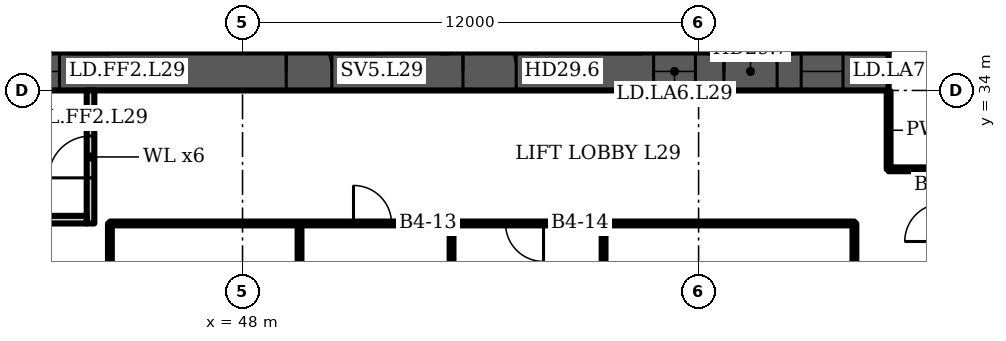
"""IFC4 building model, lengths in metres.
Left out: names, types, materials, properties, quantities, classifications, styles, units other than length and angle.
Written with IfcOpenShell. Run it as: python <this file> out.ifc"""

import sys

from ifc_helpers import new_model, si_unit, direction, frame, frame_2d, origin, place, context, subcontext, project, spatial, rectangle, extrude, element, fill, save


model = new_model("IFC4")
c1 = context("Model", 3, precision=1e-05, world=origin(), true_north=direction((0.0, 1.0)))
c2 = subcontext(c1, "Body", "Model", "MODEL_VIEW")
j1 = project(units=[si_unit("LENGTHUNIT", "METRE"), si_unit("PLANEANGLEUNIT", "RADIAN")], contexts=[c1])
p1 = place(None, origin())
s1 = spatial("IfcSite", under=j1, at=p1, CompositionType="ELEMENT")
p2 = place(p1, origin())
s2 = spatial("IfcBuilding", under=s1, at=p2, CompositionType="ELEMENT")
p3 = place(p2, frame((0.0, 0.0, 125.5)))
s3 = spatial("IfcBuildingStorey", under=s2, at=p3, CompositionType="ELEMENT", Elevation=125.5)
p4 = place(p3, frame((16.0, 34.5, 0.0), z_axis=(0.0, 0.0, 1.0), x_axis=(1.0, 0.0, 0.0)))
e1 = element("IfcWall", 1, at=p4, inside=s3, PredefinedType="SHEAR", context=c2, shape_type="SweptSolid", body=[
    extrude(rectangle(XDim=49.0, YDim=1.0, at=frame_2d((24.5, 0.0))), origin(), (0.0, 0.0, 1.0), 3.6),
])
p5 = place(p4, frame((1.2, 0.0, 0.0)))
e2 = element("IfcOpeningElement", 2, at=p5, cuts=e1, PredefinedType="OPENING", context=c2, shape_type="SweptSolid", body=[
    extrude(rectangle(XDim=1.1, YDim=2.1, at=frame_2d((0.55, 1.05))), frame((0.0, 0.51, 0.0), z_axis=(0.0, -1.0, 0.0), x_axis=(1.0, 0.0, 0.0)), (0.0, 0.0, 1.0), 1.02),
])
p6 = place(p4, frame((5.083, 0.0, 0.0)))
e3 = element("IfcOpeningElement", 3, at=p6, cuts=e1, PredefinedType="OPENING", context=c2, shape_type="SweptSolid", body=[
    extrude(rectangle(XDim=1.1, YDim=2.1, at=frame_2d((0.55, 1.05))), frame((0.0, 0.51, 0.0), z_axis=(0.0, -1.0, 0.0), x_axis=(1.0, 0.0, 0.0)), (0.0, 0.0, 1.0), 1.02),
])
p7 = place(p4, frame((2.933, 0.0, 0.0)))
e4 = element("IfcOpeningElement", 4, at=p7, cuts=e1, PredefinedType="OPENING", context=c2, shape_type="SweptSolid", body=[
    extrude(rectangle(XDim=1.4, YDim=2.1, at=frame_2d((0.7, 1.05))), frame((0.0, 0.51, 0.0), z_axis=(0.0, -1.0, 0.0), x_axis=(1.0, 0.0, 0.0)), (0.0, 0.0, 1.0), 1.02),
])
p8 = place(p4, frame((7.65, 0.0, 0.0)))
e5 = element("IfcOpeningElement", 5, at=p8, cuts=e1, PredefinedType="OPENING", context=c2, shape_type="SweptSolid", body=[
    extrude(rectangle(XDim=1.2, YDim=2.1, at=frame_2d((0.6, 1.05))), frame((0.0, 0.51, 0.0), z_axis=(0.0, -1.0, 0.0), x_axis=(1.0, 0.0, 0.0)), (0.0, 0.0, 1.0), 1.02),
])
p9 = place(p4, frame((14.817, 0.0, 0.0)))
e6 = element("IfcOpeningElement", 6, at=p9, cuts=e1, PredefinedType="OPENING", context=c2, shape_type="SweptSolid", body=[
    extrude(rectangle(XDim=1.1, YDim=2.1, at=frame_2d((0.55, 1.05))), frame((0.0, 0.51, 0.0), z_axis=(0.0, -1.0, 0.0), x_axis=(1.0, 0.0, 0.0)), (0.0, 0.0, 1.0), 1.02),
])
p10 = place(p4, frame((19.083, 0.0, 0.0)))
e7 = element("IfcOpeningElement", 7, at=p10, cuts=e1, PredefinedType="OPENING", context=c2, shape_type="SweptSolid", body=[
    extrude(rectangle(XDim=1.1, YDim=2.1, at=frame_2d((0.55, 1.05))), frame((0.0, 0.51, 0.0), z_axis=(0.0, -1.0, 0.0), x_axis=(1.0, 0.0, 0.0)), (0.0, 0.0, 1.0), 1.02),
])
p11 = place(p4, frame((16.8, 0.0, 0.0)))
e8 = element("IfcOpeningElement", 8, at=p11, cuts=e1, PredefinedType="OPENING", context=c2, shape_type="SweptSolid", body=[
    extrude(rectangle(XDim=1.4, YDim=2.1, at=frame_2d((0.7, 1.05))), frame((0.0, 0.51, 0.0), z_axis=(0.0, -1.0, 0.0), x_axis=(1.0, 0.0, 0.0)), (0.0, 0.0, 1.0), 1.02),
])
p12 = place(p4, frame((21.817, 0.0, 0.0)))
e9 = element("IfcOpeningElement", 9, at=p12, cuts=e1, PredefinedType="OPENING", context=c2, shape_type="SweptSolid", body=[
    extrude(rectangle(XDim=1.1, YDim=2.1, at=frame_2d((0.55, 1.05))), frame((0.0, 0.51, 0.0), z_axis=(0.0, -1.0, 0.0), x_axis=(1.0, 0.0, 0.0)), (0.0, 0.0, 1.0), 1.02),
])
p13 = place(p4, frame((26.083, 0.0, 0.0)))
e10 = element("IfcOpeningElement", 10, at=p13, cuts=e1, PredefinedType="OPENING", context=c2, shape_type="SweptSolid", body=[
    extrude(rectangle(XDim=1.1, YDim=2.1, at=frame_2d((0.55, 1.05))), frame((0.0, 0.51, 0.0), z_axis=(0.0, -1.0, 0.0), x_axis=(1.0, 0.0, 0.0)), (0.0, 0.0, 1.0), 1.02),
])
p14 = place(p4, frame((33.15, 0.0, 0.0)))
e11 = element("IfcOpeningElement", 11, at=p14, cuts=e1, PredefinedType="OPENING", context=c2, shape_type="SweptSolid", body=[
    extrude(rectangle(XDim=1.2, YDim=2.1, at=frame_2d((0.6, 1.05))), frame((0.0, 0.51, 0.0), z_axis=(0.0, -1.0, 0.0), x_axis=(1.0, 0.0, 0.0)), (0.0, 0.0, 1.0), 1.02),
])
p15 = place(p4, frame((37.8, 0.0, 0.0)))
e12 = element("IfcOpeningElement", 12, at=p15, cuts=e1, PredefinedType="OPENING", context=c2, shape_type="SweptSolid", body=[
    extrude(rectangle(XDim=1.4, YDim=2.1, at=frame_2d((0.7, 1.05))), frame((0.0, 0.51, 0.0), z_axis=(0.0, -1.0, 0.0), x_axis=(1.0, 0.0, 0.0)), (0.0, 0.0, 1.0), 1.02),
])
p16 = place(p4, frame((42.817, 0.0, 0.0)))
e13 = element("IfcOpeningElement", 13, at=p16, cuts=e1, PredefinedType="OPENING", context=c2, shape_type="SweptSolid", body=[
    extrude(rectangle(XDim=1.1, YDim=2.1, at=frame_2d((0.55, 1.05))), frame((0.0, 0.51, 0.0), z_axis=(0.0, -1.0, 0.0), x_axis=(1.0, 0.0, 0.0)), (0.0, 0.0, 1.0), 1.02),
])
p17 = place(p4, frame((46.7, 0.0, 0.0)))
e14 = element("IfcOpeningElement", 14, at=p17, cuts=e1, PredefinedType="OPENING", context=c2, shape_type="SweptSolid", body=[
    extrude(rectangle(XDim=1.1, YDim=2.1, at=frame_2d((0.55, 1.05))), frame((0.0, 0.51, 0.0), z_axis=(0.0, -1.0, 0.0), x_axis=(1.0, 0.0, 0.0)), (0.0, 0.0, 1.0), 1.02),
])
p18 = place(p4, frame((44.667, 0.0, 0.0)))
e15 = element("IfcOpeningElement", 15, at=p18, cuts=e1, PredefinedType="OPENING", context=c2, shape_type="SweptSolid", body=[
    extrude(rectangle(XDim=1.4, YDim=2.1, at=frame_2d((0.7, 1.05))), frame((0.0, 0.51, 0.0), z_axis=(0.0, -1.0, 0.0), x_axis=(1.0, 0.0, 0.0)), (0.0, 0.0, 1.0), 1.02),
])
p19 = place(p3, frame((44.0, 30.5, 0.0), z_axis=(0.0, 0.0, 1.0), x_axis=(0.0, 1.0, 0.0)))
e16 = element("IfcWall", 16, at=p19, inside=s3, PredefinedType="PARTITIONING", context=c2, shape_type="SweptSolid", body=[
    extrude(rectangle(XDim=3.5, YDim=0.2, at=frame_2d((1.75, 0.0))), origin(), (0.0, 0.0, 1.0), 3.2),
])
p20 = place(p19, frame((1.2, 0.0, 0.0)))
e17 = element("IfcOpeningElement", 17, at=p20, cuts=e16, PredefinedType="OPENING", context=c2, shape_type="SweptSolid", body=[
    extrude(rectangle(XDim=1.1, YDim=2.1, at=frame_2d((0.55, 1.05))), frame((0.0, 0.11, 0.0), z_axis=(0.0, -1.0, 0.0), x_axis=(1.0, 0.0, 0.0)), (0.0, 0.0, 1.0), 0.22),
])
p21 = place(p3, frame((41.1, 30.6, 0.0), z_axis=(0.0, 0.0, 1.0), x_axis=(1.0, 0.0, 0.0)))
e18 = element("IfcWall", 18, at=p21, inside=s3, PredefinedType="PARTITIONING", context=c2, shape_type="SweptSolid", body=[
    extrude(rectangle(XDim=2.8, YDim=0.2, at=frame_2d((1.4, 0.0))), origin(), (0.0, 0.0, 1.0), 3.2),
])
p22 = place(p3, frame((44.51, 8.437, 0.0), z_axis=(0.0, 0.0, 1.0), x_axis=(0.0, 1.0, 0.0)))
e19 = element("IfcWall", 19, at=p22, inside=s3, PredefinedType="PARTITIONING", context=c2, shape_type="SweptSolid", body=[
    extrude(rectangle(XDim=22.063, YDim=0.1, at=frame_2d((11.031, 0.0))), origin(), (0.0, 0.0, 1.0), 3.2),
])
p23 = place(p22, frame((12.683, 0.0, 0.0)))
e20 = element("IfcOpeningElement", 20, at=p23, cuts=e19, PredefinedType="OPENING", context=c2, shape_type="SweptSolid", body=[
    extrude(rectangle(XDim=1.8, YDim=2.1, at=frame_2d((0.9, 1.05))), frame((0.0, 0.06, 0.0), z_axis=(0.0, -1.0, 0.0), x_axis=(1.0, 0.0, 0.0)), (0.0, 0.0, 1.0), 0.12),
])
p24 = place(p3, frame((44.51, 30.5, 0.0), z_axis=(0.0, 0.0, 1.0), x_axis=(1.0, 0.0, 0.0)))
e21 = element("IfcWall", 21, at=p24, inside=s3, PredefinedType="PARTITIONING", context=c2, shape_type="SweptSolid", body=[
    extrude(rectangle(XDim=19.59, YDim=0.1, at=frame_2d((9.795, 0.0))), origin(), (0.0, 0.0, 1.0), 3.2),
])
p25 = place(p24, frame((6.41, 0.0, 0.0)))
e22 = element("IfcOpeningElement", 22, at=p25, cuts=e21, PredefinedType="OPENING", context=c2, shape_type="SweptSolid", body=[
    extrude(rectangle(XDim=1.0, YDim=2.1, at=frame_2d((0.5, 1.05))), frame((0.0, 0.06, 0.0), z_axis=(0.0, -1.0, 0.0), x_axis=(1.0, 0.0, 0.0)), (0.0, 0.0, 1.0), 0.12),
])
p26 = place(p24, frame((10.41, 0.0, 0.0)))
e23 = element("IfcOpeningElement", 23, at=p26, cuts=e21, PredefinedType="OPENING", context=c2, shape_type="SweptSolid", body=[
    extrude(rectangle(XDim=1.0, YDim=2.1, at=frame_2d((0.5, 1.05))), frame((0.0, 0.06, 0.0), z_axis=(0.0, -1.0, 0.0), x_axis=(1.0, 0.0, 0.0)), (0.0, 0.0, 1.0), 0.12),
])
p27 = place(p3, frame((49.5, -1.498, 0.0), z_axis=(0.0, 0.0, 1.0), x_axis=(0.0, 1.0, 0.0)))
e24 = element("IfcWall", 24, at=p27, inside=s3, PredefinedType="PARTITIONING", context=c2, shape_type="SweptSolid", body=[
    extrude(rectangle(XDim=31.998, YDim=0.1, at=frame_2d((15.999, 0.0))), origin(), (0.0, 0.0, 1.0), 3.2),
])
p28 = place(p3, frame((53.5, -1.148, 0.0), z_axis=(0.0, 0.0, 1.0), x_axis=(0.0, 1.0, 0.0)))
e25 = element("IfcWall", 25, at=p28, inside=s3, PredefinedType="PARTITIONING", context=c2, shape_type="SweptSolid", body=[
    extrude(rectangle(XDim=31.648, YDim=0.1, at=frame_2d((15.824, 0.0))), origin(), (0.0, 0.0, 1.0), 2.58),
])
p29 = place(p3, frame((57.5, -0.798, 0.0), z_axis=(0.0, 0.0, 1.0), x_axis=(0.0, 1.0, 0.0)))
e26 = element("IfcWall", 26, at=p29, inside=s3, PredefinedType="PARTITIONING", context=c2, shape_type="SweptSolid", body=[
    extrude(rectangle(XDim=31.298, YDim=0.1, at=frame_2d((15.649, 0.0))), origin(), (0.0, 0.0, 1.0), 2.58),
])
p30 = place(p3, frame((64.1, 10.095, 0.0), z_axis=(0.0, 0.0, 1.0), x_axis=(0.0, 1.0, 0.0)))
e27 = element("IfcWall", 27, at=p30, inside=s3, PredefinedType="PARTITIONING", context=c2, shape_type="SweptSolid", body=[
    extrude(rectangle(XDim=20.405, YDim=0.1, at=frame_2d((10.203, 0.0))), origin(), (0.0, 0.0, 1.0), 3.2),
])
p31 = place(p30, frame((8.905, 0.0, 0.0)))
e28 = element("IfcOpeningElement", 28, at=p31, cuts=e27, PredefinedType="OPENING", context=c2, shape_type="SweptSolid", body=[
    extrude(rectangle(XDim=1.0, YDim=2.1, at=frame_2d((0.5, 1.05))), frame((0.0, 0.06, 0.0), z_axis=(0.0, -1.0, 0.0), x_axis=(1.0, 0.0, 0.0)), (0.0, 0.0, 1.0), 0.12),
])
p32 = place(p3, frame((65.0, 31.925, 0.0), z_axis=(0.0, 0.0, 1.0), x_axis=(0.0, 1.0, 0.0)))
e29 = element("IfcWall", 29, at=p32, inside=s3, PredefinedType="PARTITIONING", context=c2, shape_type="SweptSolid", body=[
    extrude(rectangle(XDim=2.055, YDim=0.1, at=frame_2d((1.027, 0.0))), origin(), (0.0, 0.0, 1.0), 3.2),
])
p33 = place(p3, frame((65.0, 31.925, 0.0), z_axis=(0.0, 0.0, 1.0), x_axis=(1.0, 0.0, 0.0)))
e30 = element("IfcWall", 30, at=p33, inside=s3, PredefinedType="PARTITIONING", context=c2, shape_type="SweptSolid", body=[
    extrude(rectangle(XDim=1.425, YDim=0.1, at=frame_2d((0.712, 0.0))), origin(), (0.0, 0.0, 1.0), 3.2),
])
p34 = place(p3, frame((65.9, 27.435, 0.0), z_axis=(0.0, 0.0, 1.0), x_axis=(0.178584, 0.983924, 0.0)))
e31 = element("IfcWall", 31, at=p34, inside=s3, PredefinedType="PARTITIONING", context=c2, shape_type="SweptSolid", body=[
    extrude(rectangle(XDim=2.353, YDim=0.1, at=frame_2d((1.176, 0.0))), origin(), (0.0, 0.0, 1.0), 3.2),
])
p35 = place(p13, origin())
e32 = element("IfcDoor", 32, at=p35, inside=s3, OperationType="DOUBLE_DOOR_SLIDING", PredefinedType="DOOR", context=c2, shape_type="SweptSolid", body=[
    extrude(rectangle(XDim=1.1, YDim=2.1, at=frame_2d((0.55, 1.05))), frame((0.0, 0.025, 0.0), z_axis=(0.0, -1.0, 0.0), x_axis=(1.0, 0.0, 0.0)), (0.0, 0.0, 1.0), 0.05),
])
fill(e10, e32)
p36 = place(p14, origin())
e33 = element("IfcDoor", 33, at=p36, inside=s3, OperationType="SINGLE_SWING_LEFT", PredefinedType="DOOR", context=c2, shape_type="SweptSolid", body=[
    extrude(rectangle(XDim=1.2, YDim=2.1, at=frame_2d((0.6, 1.05))), frame((0.0, 0.025, 0.0), z_axis=(0.0, -1.0, 0.0), x_axis=(1.0, 0.0, 0.0)), (0.0, 0.0, 1.0), 0.05),
])
fill(e11, e33)
p37 = place(p15, origin())
e34 = element("IfcDoor", 34, at=p37, inside=s3, OperationType="DOUBLE_DOOR_SINGLE_SWING", PredefinedType="DOOR", context=c2, shape_type="SweptSolid", body=[
    extrude(rectangle(XDim=1.4, YDim=2.1, at=frame_2d((0.7, 1.05))), frame((0.0, 0.025, 0.0), z_axis=(0.0, -1.0, 0.0), x_axis=(1.0, 0.0, 0.0)), (0.0, 0.0, 1.0), 0.05),
])
fill(e12, e34)
p38 = place(p16, origin())
e35 = element("IfcDoor", 35, at=p38, inside=s3, OperationType="DOUBLE_DOOR_SLIDING", PredefinedType="DOOR", context=c2, shape_type="SweptSolid", body=[
    extrude(rectangle(XDim=1.1, YDim=2.1, at=frame_2d((0.55, 1.05))), frame((0.0, 0.025, 0.0), z_axis=(0.0, -1.0, 0.0), x_axis=(1.0, 0.0, 0.0)), (0.0, 0.0, 1.0), 0.05),
])
fill(e13, e35)
p39 = place(p17, origin())
e36 = element("IfcDoor", 36, at=p39, inside=s3, OperationType="DOUBLE_DOOR_SLIDING", PredefinedType="DOOR", context=c2, shape_type="SweptSolid", body=[
    extrude(rectangle(XDim=1.1, YDim=2.1, at=frame_2d((0.55, 1.05))), frame((0.0, 0.025, 0.0), z_axis=(0.0, -1.0, 0.0), x_axis=(1.0, 0.0, 0.0)), (0.0, 0.0, 1.0), 0.05),
])
fill(e14, e36)
p40 = place(p18, origin())
e37 = element("IfcDoor", 37, at=p40, inside=s3, OperationType="DOUBLE_DOOR_SINGLE_SWING", PredefinedType="DOOR", context=c2, shape_type="SweptSolid", body=[
    extrude(rectangle(XDim=1.4, YDim=2.1, at=frame_2d((0.7, 1.05))), frame((0.0, 0.025, 0.0), z_axis=(0.0, -1.0, 0.0), x_axis=(1.0, 0.0, 0.0)), (0.0, 0.0, 1.0), 0.05),
])
fill(e15, e37)
p41 = place(p20, origin())
e38 = element("IfcDoor", 38, at=p41, inside=s3, OperationType="SINGLE_SWING_LEFT", PredefinedType="DOOR", context=c2, shape_type="SweptSolid", body=[
    extrude(rectangle(XDim=1.1, YDim=2.1, at=frame_2d((0.55, 1.05))), frame((0.0, 0.025, 0.0), z_axis=(0.0, -1.0, 0.0), x_axis=(1.0, 0.0, 0.0)), (0.0, 0.0, 1.0), 0.05),
])
fill(e17, e38)
p42 = place(p25, origin())
e39 = element("IfcDoor", 39, at=p42, inside=s3, OperationType="SINGLE_SWING_LEFT", PredefinedType="DOOR", context=c2, shape_type="SweptSolid", body=[
    extrude(rectangle(XDim=1.0, YDim=2.1, at=frame_2d((0.5, 1.05))), frame((0.0, 0.025, 0.0), z_axis=(0.0, -1.0, 0.0), x_axis=(1.0, 0.0, 0.0)), (0.0, 0.0, 1.0), 0.05),
])
fill(e22, e39)
p43 = place(p26, origin())
e40 = element("IfcDoor", 40, at=p43, inside=s3, OperationType="SINGLE_SWING_RIGHT", PredefinedType="DOOR", context=c2, shape_type="SweptSolid", body=[
    extrude(rectangle(XDim=1.0, YDim=2.1, at=frame_2d((0.5, 1.05))), frame((0.0, 0.025, 0.0), z_axis=(0.0, -1.0, 0.0), x_axis=(1.0, 0.0, 0.0)), (0.0, 0.0, 1.0), 0.05),
])
fill(e23, e40)
save(model, sys.argv[1])
